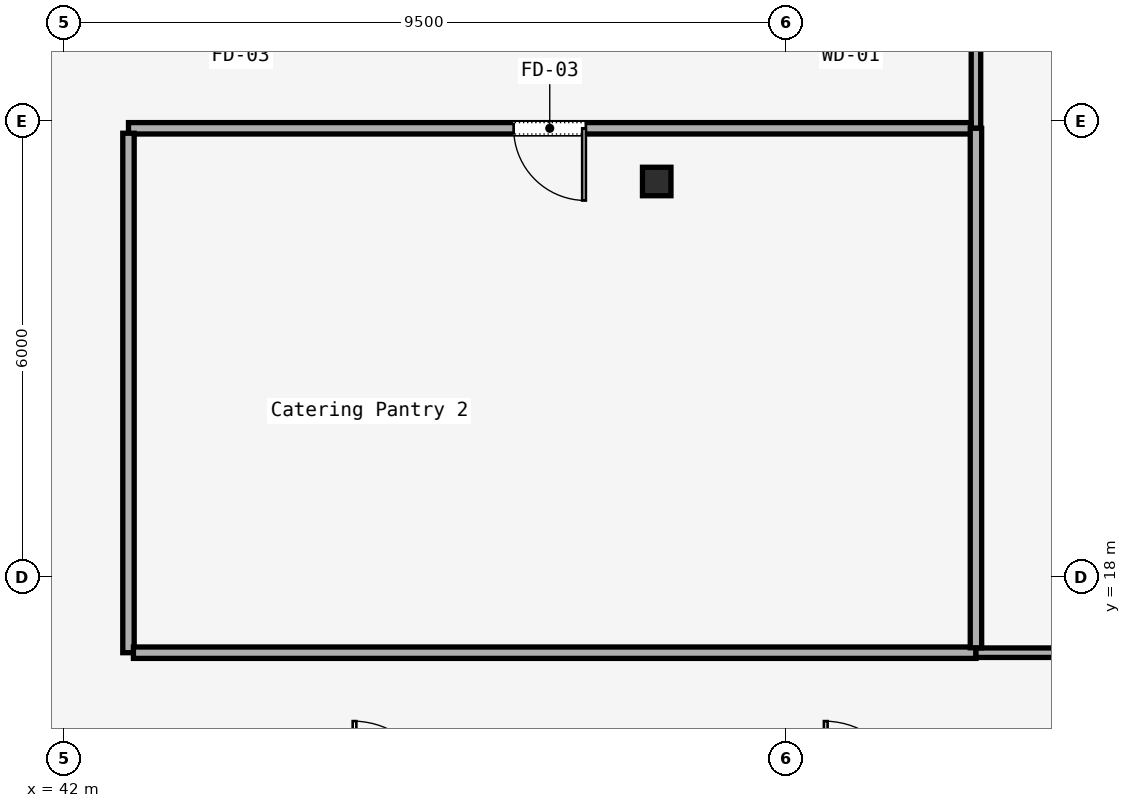
"""IFC4 building model, lengths in metres.
Left out: names, types, materials, properties, quantities, classifications, styles, units other than length and angle.
Written with IfcOpenShell. Run it as: python <this file> out.ifc"""

import sys

from ifc_helpers import new_model, si_unit, direction, frame, frame_2d, origin, origin_2d, place, context, subcontext, project, spatial, rectangle, i_section, extrude, element, fill, save


model = new_model("IFC4")
c1 = context("Model", 3, precision=1e-05, world=origin(), true_north=direction((0.0, 1.0)))
c2 = subcontext(c1, "Body", "Model", "MODEL_VIEW")
j1 = project(units=[si_unit("LENGTHUNIT", "METRE"), si_unit("PLANEANGLEUNIT", "RADIAN")], contexts=[c1])
p1 = place(None, origin())
s1 = spatial("IfcSite", under=j1, at=p1, CompositionType="ELEMENT")
p2 = place(p1, origin())
s2 = spatial("IfcBuilding", under=s1, at=p2, CompositionType="ELEMENT")
p3 = place(p2, frame((0.0, 0.0, 259.8)))
s3 = spatial("IfcBuildingStorey", under=s2, at=p3, CompositionType="ELEMENT", Elevation=259.8)
p4 = place(p3, frame((49.8, 23.2, 0.0), z_axis=(0.0, 0.0, 1.0), x_axis=(1.0, 0.0, 0.0)))
e1 = element("IfcColumn", 1, at=p4, inside=s3, PredefinedType="COLUMN", context=c2, shape_type="SweptSolid", body=[
    extrude(i_section(OverallWidth=0.375, OverallDepth=0.375, WebThickness=0.017, FlangeThickness=0.027, FilletRadius=0.015, at=origin_2d()), origin(), (0.0, 0.0, 1.0), 3.58),
])
p5 = place(p3, frame((54.0, 25.535, 0.0), z_axis=(0.0, 0.0, 1.0), x_axis=(0.0, -1.0, 0.0)))
e2 = element("IfcWall", 2, at=p5, inside=s3, PredefinedType="PARTITIONING", context=c2, shape_type="SweptSolid", body=[
    extrude(rectangle(XDim=1.635, YDim=0.125, at=frame_2d((0.817, 0.0))), origin(), (0.0, 0.0, 1.0), 3.01),
])
p6 = place(p3, frame((53.935, 23.9, 0.0), z_axis=(0.0, 0.0, 1.0), x_axis=(-1.0, 0.0, 0.0)))
e3 = element("IfcWall", 3, at=p6, inside=s3, PredefinedType="PARTITIONING", context=c2, shape_type="SweptSolid", body=[
    extrude(rectangle(XDim=11.085, YDim=0.15, at=frame_2d((5.542, 0.0))), origin(), (0.0, 0.0, 1.0), 3.01),
])
p7 = place(p6, frame((5.067, 0.0, 0.0)))
e4 = element("IfcOpeningElement", 4, at=p7, cuts=e3, PredefinedType="OPENING", context=c2, shape_type="SweptSolid", body=[
    extrude(rectangle(XDim=0.95, YDim=2.2, at=frame_2d((0.475, 1.1))), frame((0.0, 0.075, 0.0), z_axis=(0.0, -1.0, 0.0), x_axis=(1.0, 0.0, 0.0)), (0.0, 0.0, 1.0), 0.15),
])
p8 = place(p3, frame((42.85, 23.835, 0.0), z_axis=(0.0, 0.0, 1.0), x_axis=(0.0, -1.0, 0.0)))
e5 = element("IfcWall", 5, at=p8, inside=s3, PredefinedType="PARTITIONING", context=c2, shape_type="SweptSolid", body=[
    extrude(rectangle(XDim=6.835, YDim=0.15, at=frame_2d((3.417, 0.0))), origin(), (0.0, 0.0, 1.0), 3.01),
])
p9 = place(p3, frame((42.915, 17.0, 0.0), z_axis=(0.0, 0.0, 1.0), x_axis=(1.0, 0.0, 0.0)))
e6 = element("IfcWall", 6, at=p9, inside=s3, PredefinedType="PARTITIONING", context=c2, shape_type="SweptSolid", body=[
    extrude(rectangle(XDim=11.085, YDim=0.15, at=frame_2d((5.542, 0.0))), origin(), (0.0, 0.0, 1.0), 3.01),
])
p10 = place(p3, frame((54.0, 17.0, 0.0), z_axis=(0.0, 0.0, 1.0), x_axis=(1.0, 0.0, 0.0)))
e7 = element("IfcWall", 7, at=p10, inside=s3, PredefinedType="PARTITIONING", context=c2, shape_type="SweptSolid", body=[
    extrude(rectangle(XDim=6.62, YDim=0.125, at=frame_2d((3.31, 0.0))), origin(), (0.0, 0.0, 1.0), 3.01),
])
p11 = place(p10, frame((2.835, 0.0, 0.0)))
e8 = element("IfcOpeningElement", 8, at=p11, cuts=e7, PredefinedType="OPENING", context=c2, shape_type="SweptSolid", body=[
    extrude(rectangle(XDim=0.95, YDim=2.2, at=frame_2d((0.475, 1.1))), frame((0.0, 0.062, 0.0), z_axis=(0.0, -1.0, 0.0), x_axis=(1.0, 0.0, 0.0)), (0.0, 0.0, 1.0), 0.125),
])
p12 = place(p3, frame((54.0, 23.9, 0.0), z_axis=(0.0, 0.0, 1.0), x_axis=(0.0, -1.0, 0.0)))
e9 = element("IfcWall", 9, at=p12, inside=s3, PredefinedType="PARTITIONING", context=c2, shape_type="SweptSolid", body=[
    extrude(rectangle(XDim=6.835, YDim=0.15, at=frame_2d((3.417, 0.0))), origin(), (0.0, 0.0, 1.0), 3.01),
])
p13 = place(p7, origin())
e10 = element("IfcDoor", 10, at=p13, inside=s3, OperationType="SINGLE_SWING_RIGHT", PredefinedType="DOOR", context=c2, shape_type="SweptSolid", body=[
    extrude(rectangle(XDim=0.95, YDim=2.2, at=frame_2d((0.475, 1.1))), frame((0.0, 0.025, 0.0), z_axis=(0.0, -1.0, 0.0), x_axis=(1.0, 0.0, 0.0)), (0.0, 0.0, 1.0), 0.05),
])
fill(e4, e10)
save(model, sys.argv[1])
